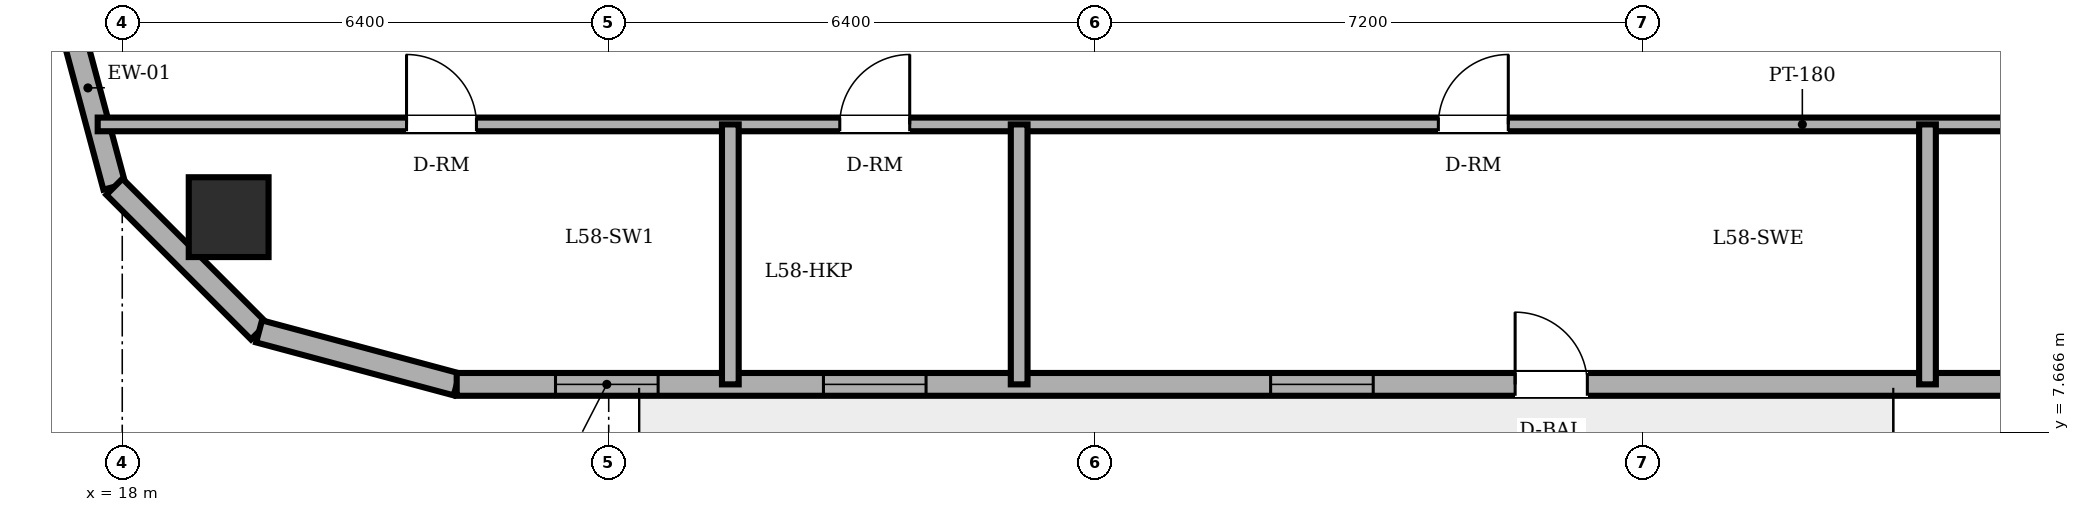
"""IFC4 building model, lengths in metres.
Left out: names, types, materials, properties, quantities, classifications, styles, units other than length and angle.
Written with IfcOpenShell. Run it as: python <this file> out.ifc"""

import sys

from ifc_helpers import new_model, si_unit, direction, frame, frame_2d, origin, origin_2d, place, context, subcontext, project, spatial, rectangle, circle, extrude, element, fill, save


model = new_model("IFC4")
c1 = context("Model", 3, precision=1e-05, world=origin(), true_north=direction((0.0, 1.0)))
c2 = subcontext(c1, "Body", "Model", "MODEL_VIEW")
j1 = project(units=[si_unit("LENGTHUNIT", "METRE"), si_unit("PLANEANGLEUNIT", "RADIAN")], contexts=[c1])
p1 = place(None, origin())
s1 = spatial("IfcSite", under=j1, at=p1, CompositionType="ELEMENT")
p2 = place(p1, origin())
s2 = spatial("IfcBuilding", under=s1, at=p2, CompositionType="ELEMENT")
p3 = place(p2, frame((0.0, 0.0, 222.9)))
s3 = spatial("IfcBuildingStorey", under=s2, at=p3, CompositionType="ELEMENT", Elevation=222.9)
p4 = place(p3, frame((19.4, 10.5, 0.0), z_axis=(0.0, 0.0, 1.0), x_axis=(1.0, 0.0, 0.0)))
e1 = element("IfcColumn", 1, at=p4, inside=s3, PredefinedType="COLUMN", context=c2, shape_type="SweptSolid", body=[
    extrude(circle(Radius=0.525, at=origin_2d()), origin(), (0.0, 0.0, 1.0), 3.6),
])
p5 = place(p3, frame((17.2, 13.5, 0.0), z_axis=(0.0, 0.0, 1.0), x_axis=(0.258932525951, -0.965895412042, 0.0)))
e2 = element("IfcWall", 2, at=p5, inside=s3, PredefinedType="SOLIDWALL", context=c2, shape_type="SweptSolid", body=[
    extrude(rectangle(XDim=2.692, YDim=0.3, at=frame_2d((1.346, 0.0))), origin(), (0.0, 0.0, 1.0), 3.4),
])
p6 = place(p3, frame((17.897, 10.9, 0.0), z_axis=(0.0, 0.0, 1.0), x_axis=(0.707152139074, -0.70706142039, 0.0)))
e3 = element("IfcWall", 3, at=p6, inside=s3, PredefinedType="SOLIDWALL", context=c2, shape_type="SweptSolid", body=[
    extrude(rectangle(XDim=2.691, YDim=0.3, at=frame_2d((1.346, 0.0))), origin(), (0.0, 0.0, 1.0), 3.4),
])
p7 = place(p3, frame((19.8, 8.997, 0.0), z_axis=(0.0, 0.0, 1.0), x_axis=(0.965889330541, -0.258955210695, 0.0)))
e4 = element("IfcWall", 4, at=p7, inside=s3, PredefinedType="SOLIDWALL", context=c2, shape_type="SweptSolid", body=[
    extrude(rectangle(XDim=2.692, YDim=0.3, at=frame_2d((1.346, 0.0))), origin(), (0.0, 0.0, 1.0), 3.4),
])
p8 = place(p3, frame((22.4, 8.3, 0.0), z_axis=(0.0, 0.0, 1.0), x_axis=(1.0, 0.0, 0.0)))
e5 = element("IfcWall", 5, at=p8, inside=s3, PredefinedType="SOLIDWALL", context=c2, shape_type="SweptSolid", body=[
    extrude(rectangle(XDim=32.485, YDim=0.3, at=frame_2d((16.243, 0.0))), origin(), (0.0, 0.0, 1.0), 3.4),
])
p9 = place(p8, frame((13.925, 0.0, 0.0)))
e6 = element("IfcOpeningElement", 6, at=p9, cuts=e5, PredefinedType="OPENING", context=c2, shape_type="SweptSolid", body=[
    extrude(rectangle(XDim=0.95, YDim=2.2, at=frame_2d((0.475, 1.1))), frame((0.0, 0.16, 0.0), z_axis=(0.0, -1.0, 0.0), x_axis=(1.0, 0.0, 0.0)), (0.0, 0.0, 1.0), 0.32),
])
p10 = place(p8, frame((1.3, 0.0, 0.85)))
e7 = element("IfcOpeningElement", 7, at=p10, cuts=e5, PredefinedType="OPENING", context=c2, shape_type="SweptSolid", body=[
    extrude(rectangle(XDim=1.35, YDim=1.55, at=frame_2d((0.675, 0.775))), frame((0.0, 0.16, 0.0), z_axis=(0.0, -1.0, 0.0), x_axis=(1.0, 0.0, 0.0)), (0.0, 0.0, 1.0), 0.32),
])
p11 = place(p8, frame((4.825, 0.0, 0.85)))
e8 = element("IfcOpeningElement", 8, at=p11, cuts=e5, PredefinedType="OPENING", context=c2, shape_type="SweptSolid", body=[
    extrude(rectangle(XDim=1.35, YDim=1.55, at=frame_2d((0.675, 0.775))), frame((0.0, 0.16, 0.0), z_axis=(0.0, -1.0, 0.0), x_axis=(1.0, 0.0, 0.0)), (0.0, 0.0, 1.0), 0.32),
])
p12 = place(p8, frame((10.708, 0.0, 0.85)))
e9 = element("IfcOpeningElement", 9, at=p12, cuts=e5, PredefinedType="OPENING", context=c2, shape_type="SweptSolid", body=[
    extrude(rectangle(XDim=1.35, YDim=1.55, at=frame_2d((0.675, 0.775))), frame((0.0, 0.16, 0.0), z_axis=(0.0, -1.0, 0.0), x_axis=(1.0, 0.0, 0.0)), (0.0, 0.0, 1.0), 0.32),
])
p13 = place(p8, frame((22.937, 0.0, 0.85)))
e10 = element("IfcOpeningElement", 10, at=p13, cuts=e5, PredefinedType="OPENING", context=c2, shape_type="SweptSolid", body=[
    extrude(rectangle(XDim=1.35, YDim=1.55, at=frame_2d((0.675, 0.775))), frame((0.0, 0.16, 0.0), z_axis=(0.0, -1.0, 0.0), x_axis=(1.0, 0.0, 0.0)), (0.0, 0.0, 1.0), 0.32),
])
p14 = place(p8, frame((27.198, 0.0, 0.85)))
e11 = element("IfcOpeningElement", 11, at=p14, cuts=e5, PredefinedType="OPENING", context=c2, shape_type="SweptSolid", body=[
    extrude(rectangle(XDim=1.35, YDim=1.55, at=frame_2d((0.675, 0.775))), frame((0.0, 0.16, 0.0), z_axis=(0.0, -1.0, 0.0), x_axis=(1.0, 0.0, 0.0)), (0.0, 0.0, 1.0), 0.32),
])
p15 = place(p3, frame((17.677, 11.72, 0.0), z_axis=(0.0, 0.0, 1.0), x_axis=(1.0, 0.0, 0.0)))
e12 = element("IfcWall", 12, at=p15, inside=s3, PredefinedType="PARTITIONING", context=c2, shape_type="SweptSolid", body=[
    extrude(rectangle(XDim=44.853, YDim=0.18, at=frame_2d((22.427, 0.0))), origin(), (0.0, 0.0, 1.0), 3.4),
])
p16 = place(p15, frame((9.763, 0.0, 0.0)))
e13 = element("IfcOpeningElement", 13, at=p16, cuts=e12, PredefinedType="OPENING", context=c2, shape_type="SweptSolid", body=[
    extrude(rectangle(XDim=0.92, YDim=2.1, at=frame_2d((0.46, 1.05))), frame((0.0, 0.1, 0.0), z_axis=(0.0, -1.0, 0.0), x_axis=(1.0, 0.0, 0.0)), (0.0, 0.0, 1.0), 0.2),
])
p17 = place(p15, frame((26.113, 0.0, 0.0)))
e14 = element("IfcOpeningElement", 14, at=p17, cuts=e12, PredefinedType="OPENING", context=c2, shape_type="SweptSolid", body=[
    extrude(rectangle(XDim=0.92, YDim=2.1, at=frame_2d((0.46, 1.05))), frame((0.0, 0.1, 0.0), z_axis=(0.0, -1.0, 0.0), x_axis=(1.0, 0.0, 0.0)), (0.0, 0.0, 1.0), 0.2),
])
p18 = place(p15, frame((4.063, 0.0, 0.0)))
e15 = element("IfcOpeningElement", 15, at=p18, cuts=e12, PredefinedType="OPENING", context=c2, shape_type="SweptSolid", body=[
    extrude(rectangle(XDim=0.92, YDim=2.1, at=frame_2d((0.46, 1.05))), frame((0.0, 0.1, 0.0), z_axis=(0.0, -1.0, 0.0), x_axis=(1.0, 0.0, 0.0)), (0.0, 0.0, 1.0), 0.2),
])
p19 = place(p15, frame((17.638, 0.0, 0.0)))
e16 = element("IfcOpeningElement", 16, at=p19, cuts=e12, PredefinedType="OPENING", context=c2, shape_type="SweptSolid", body=[
    extrude(rectangle(XDim=0.92, YDim=2.1, at=frame_2d((0.46, 1.05))), frame((0.0, 0.1, 0.0), z_axis=(0.0, -1.0, 0.0), x_axis=(1.0, 0.0, 0.0)), (0.0, 0.0, 1.0), 0.2),
])
for number, where, z_axis, x_axis in (
    (17, (26.0, 8.3, 0.0), (0.0, 0.0, 1.0), (0.0, 1.0, 0.0)),
    (18, (29.8, 8.3, 0.0), (0.0, 0.0, 1.0), (0.0, 1.0, 0.0)),
    (19, (41.75, 8.3, 0.0), (0.0, 0.0, 1.0), (0.0, 1.0, 0.0)),
):
    element("IfcWall", number, at=place(p3, frame(where, z_axis=z_axis, x_axis=x_axis)), inside=s3, PredefinedType="PARTITIONING", context=c2, shape_type="SweptSolid", body=[
        extrude(rectangle(XDim=3.42, YDim=0.22, at=frame_2d((1.71, 0.0))), origin(), (0.0, 0.0, 1.0), 3.4),
    ])
p20 = place(p9, origin())
e20 = element("IfcDoor", 20, at=p20, inside=s3, OperationType="SINGLE_SWING_LEFT", PredefinedType="DOOR", context=c2, shape_type="SweptSolid", body=[
    extrude(rectangle(XDim=0.95, YDim=2.2, at=frame_2d((0.475, 1.1))), frame((0.0, 0.025, 0.0), z_axis=(0.0, -1.0, 0.0), x_axis=(1.0, 0.0, 0.0)), (0.0, 0.0, 1.0), 0.05),
])
fill(e6, e20)
p21 = place(p10, origin())
e21 = element("IfcWindow", 21, at=p21, inside=s3, PartitioningType="SINGLE_PANEL", PredefinedType="WINDOW", context=c2, shape_type="SweptSolid", body=[
    extrude(rectangle(XDim=1.35, YDim=1.55, at=frame_2d((0.675, 0.775))), frame((0.0, 0.03, 0.0), z_axis=(0.0, -1.0, 0.0), x_axis=(1.0, 0.0, 0.0)), (0.0, 0.0, 1.0), 0.06),
])
fill(e7, e21)
p22 = place(p11, origin())
e22 = element("IfcWindow", 22, at=p22, inside=s3, PartitioningType="SINGLE_PANEL", PredefinedType="WINDOW", context=c2, shape_type="SweptSolid", body=[
    extrude(rectangle(XDim=1.35, YDim=1.55, at=frame_2d((0.675, 0.775))), frame((0.0, 0.03, 0.0), z_axis=(0.0, -1.0, 0.0), x_axis=(1.0, 0.0, 0.0)), (0.0, 0.0, 1.0), 0.06),
])
fill(e8, e22)
p23 = place(p12, origin())
e23 = element("IfcWindow", 23, at=p23, inside=s3, PartitioningType="SINGLE_PANEL", PredefinedType="WINDOW", context=c2, shape_type="SweptSolid", body=[
    extrude(rectangle(XDim=1.35, YDim=1.55, at=frame_2d((0.675, 0.775))), frame((0.0, 0.03, 0.0), z_axis=(0.0, -1.0, 0.0), x_axis=(1.0, 0.0, 0.0)), (0.0, 0.0, 1.0), 0.06),
])
fill(e9, e23)
p24 = place(p16, origin())
e24 = element("IfcDoor", 24, at=p24, inside=s3, OperationType="SINGLE_SWING_RIGHT", PredefinedType="DOOR", context=c2, shape_type="SweptSolid", body=[
    extrude(rectangle(XDim=0.92, YDim=2.1, at=frame_2d((0.46, 1.05))), frame((0.0, 0.025, 0.0), z_axis=(0.0, -1.0, 0.0), x_axis=(1.0, 0.0, 0.0)), (0.0, 0.0, 1.0), 0.05),
])
fill(e13, e24)
p25 = place(p18, origin())
e25 = element("IfcDoor", 25, at=p25, inside=s3, OperationType="SINGLE_SWING_LEFT", PredefinedType="DOOR", context=c2, shape_type="SweptSolid", body=[
    extrude(rectangle(XDim=0.92, YDim=2.1, at=frame_2d((0.46, 1.05))), frame((0.0, 0.025, 0.0), z_axis=(0.0, -1.0, 0.0), x_axis=(1.0, 0.0, 0.0)), (0.0, 0.0, 1.0), 0.05),
])
fill(e15, e25)
p26 = place(p19, origin())
e26 = element("IfcDoor", 26, at=p26, inside=s3, OperationType="SINGLE_SWING_RIGHT", PredefinedType="DOOR", context=c2, shape_type="SweptSolid", body=[
    extrude(rectangle(XDim=0.92, YDim=2.1, at=frame_2d((0.46, 1.05))), frame((0.0, 0.025, 0.0), z_axis=(0.0, -1.0, 0.0), x_axis=(1.0, 0.0, 0.0)), (0.0, 0.0, 1.0), 0.05),
])
fill(e16, e26)
save(model, sys.argv[1])
